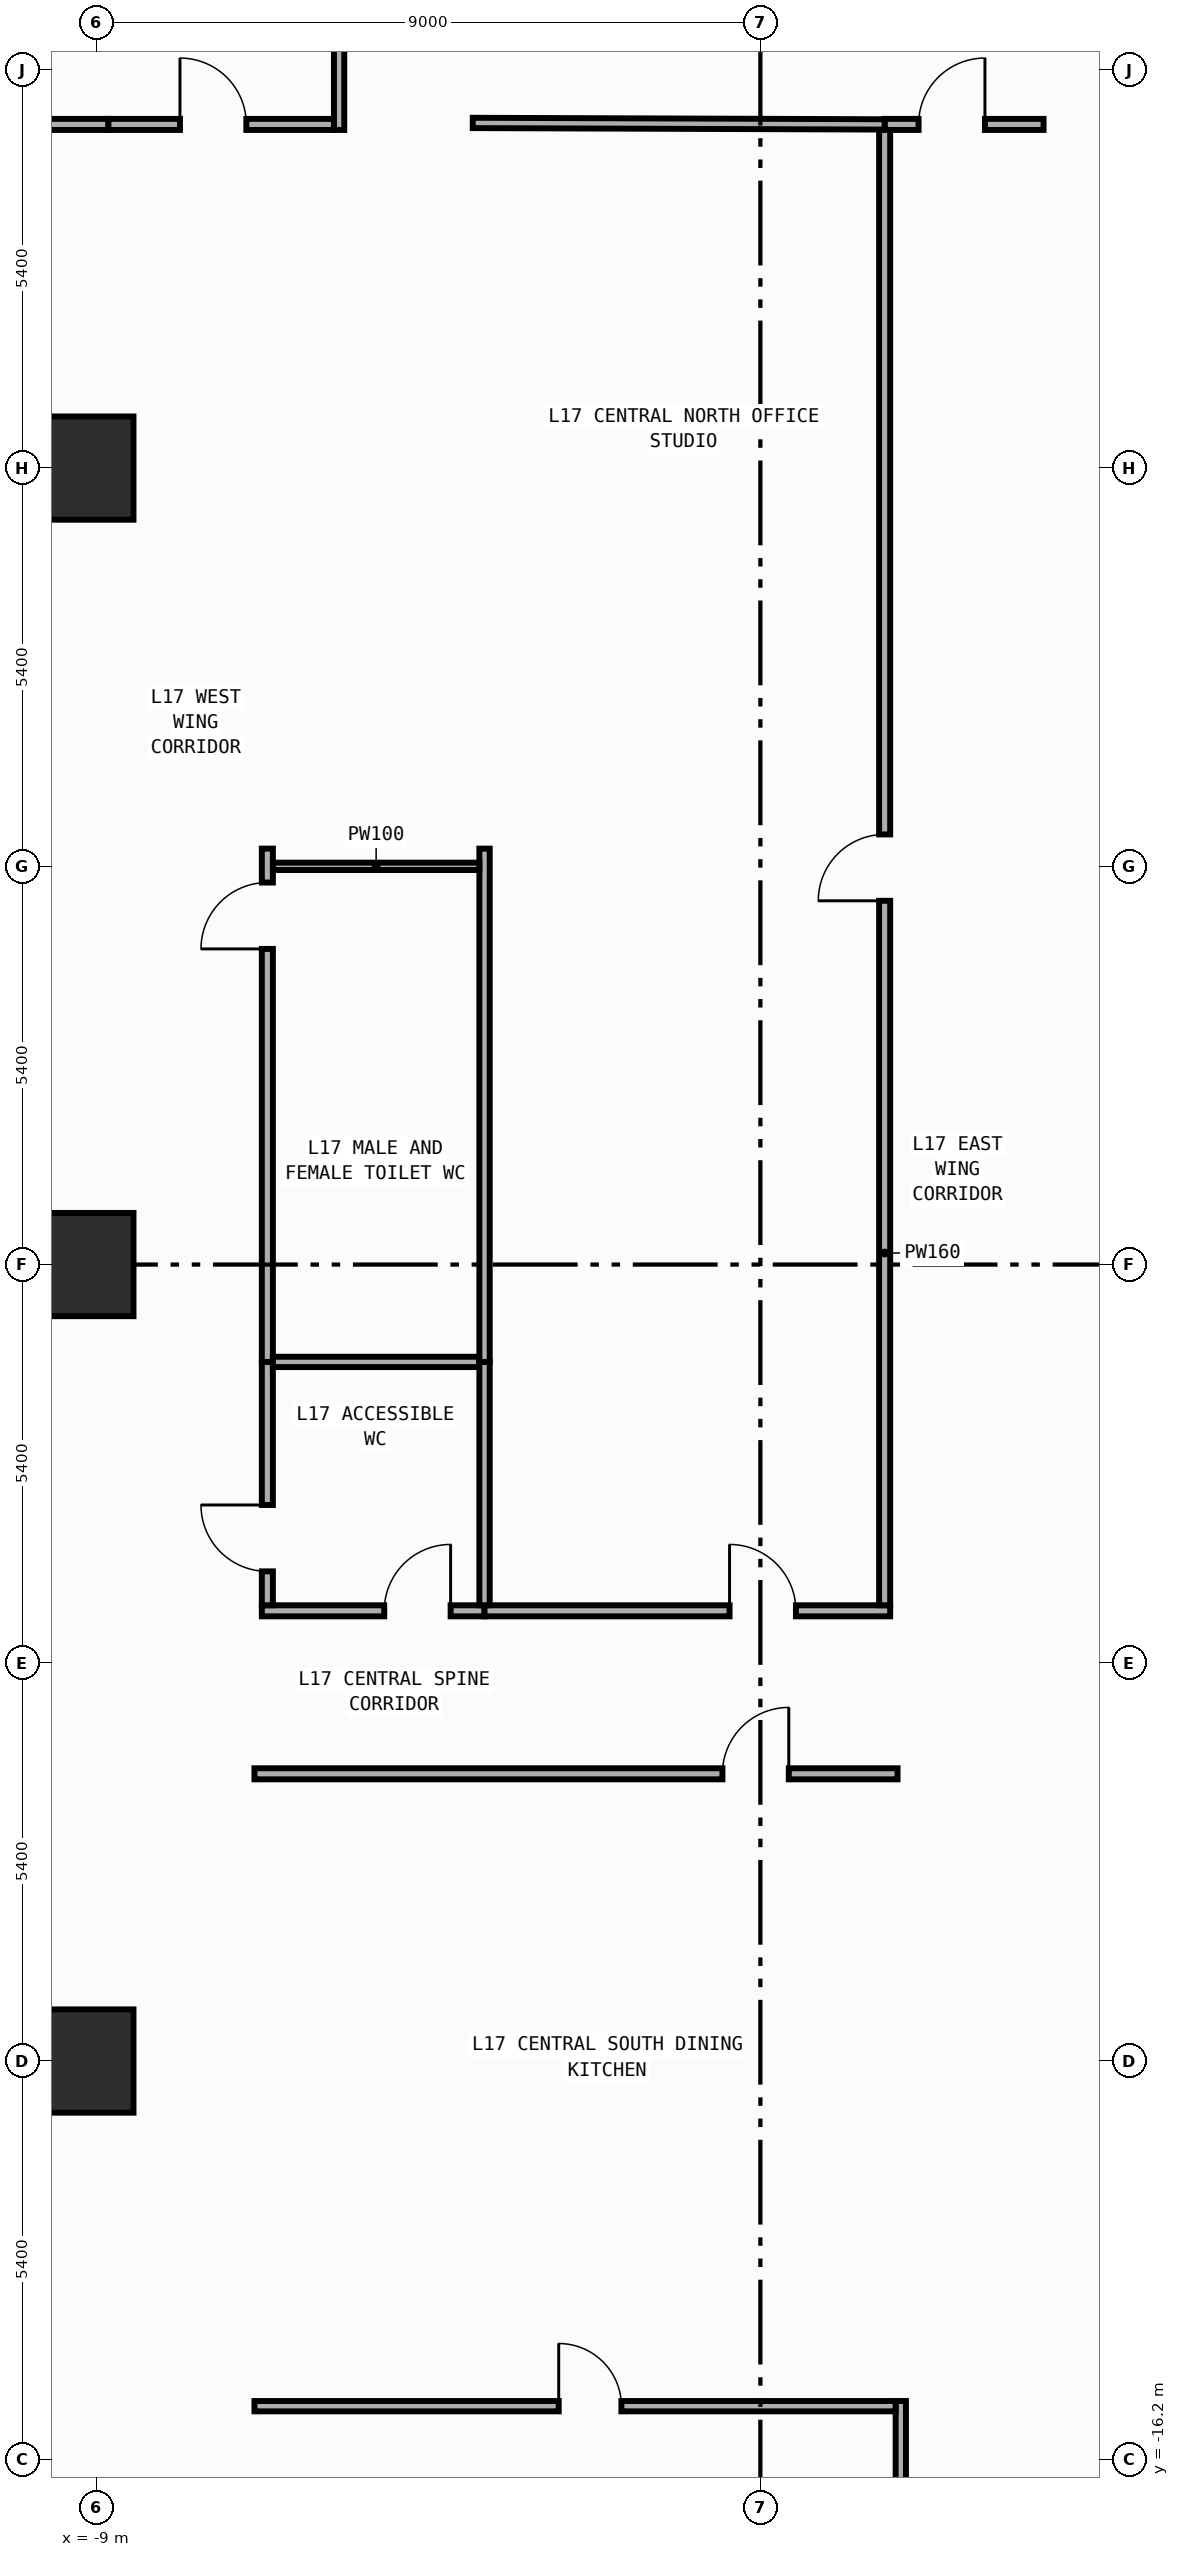
"""IFC4 building model, lengths in metres.
Left out: names, types, materials, properties, quantities, classifications, styles, units other than length and angle.
Written with IfcOpenShell. Run it as: python <this file> out.ifc"""

import sys

from ifc_helpers import new_model, si_unit, direction, frame, frame_2d, origin, origin_2d, place, context, subcontext, project, spatial, rectangle, extrude, element, fill, save


model = new_model("IFC4")
c1 = context("Model", 3, precision=1e-05, world=origin(), true_north=direction((0.0, 1.0)))
c2 = subcontext(c1, "Body", "Model", "MODEL_VIEW")
j1 = project(units=[si_unit("LENGTHUNIT", "METRE"), si_unit("PLANEANGLEUNIT", "RADIAN")], contexts=[c1])
p1 = place(None, origin())
s1 = spatial("IfcSite", under=j1, at=p1, CompositionType="ELEMENT")
p2 = place(p1, origin())
s2 = spatial("IfcBuilding", under=s1, at=p2, CompositionType="ELEMENT")
p3 = place(p2, frame((0.0, 0.0, 72.2)))
s3 = spatial("IfcBuildingStorey", under=s2, at=p3, CompositionType="ELEMENT", Elevation=72.2)
for number, where, z_axis, x_axis in (
    (1, (-9.2, -10.8, 0.0), (0.0, 0.0, 1.0), (1.0, 0.0, 0.0)),
    (2, (-9.2, 0.0, 0.0), (0.0, 0.0, 1.0), (1.0, 0.0, 0.0)),
    (3, (-9.2, 10.8, 0.0), (0.0, 0.0, 1.0), (1.0, 0.0, 0.0)),
):
    element("IfcColumn", number, at=place(p3, frame(where, z_axis=z_axis, x_axis=x_axis)), inside=s3, PredefinedType="COLUMN", context=c2, shape_type="SweptSolid", body=[
        extrude(rectangle(XDim=1.4, YDim=1.4, at=origin_2d()), origin(), (0.0, 0.0, 1.0), 4.2),
    ])
p4 = place(p3, frame((-11.99, 15.46, 0.0), z_axis=(0.0, 0.0, 1.0), x_axis=(1.0, 0.0, 0.0)))
e4 = element("IfcWall", 4, at=p4, inside=s3, PredefinedType="PARTITIONING", context=c2, shape_type="SweptSolid", body=[
    extrude(rectangle(XDim=3.15, YDim=0.15, at=frame_2d((1.575, 0.0))), origin(), (0.0, 0.0, 1.0), 3.94),
])
p5 = place(p4, frame((0.46, 0.0, 0.0)))
e5 = element("IfcOpeningElement", 5, at=p5, cuts=e4, PredefinedType="OPENING", context=c2, shape_type="SweptSolid", body=[
    extrude(rectangle(XDim=0.9, YDim=2.15, at=frame_2d((0.45, 1.075))), frame((0.0, 0.085, 0.0), z_axis=(0.0, -1.0, 0.0), x_axis=(1.0, 0.0, 0.0)), (0.0, 0.0, 1.0), 0.17),
])
p6 = place(p3, frame((-6.76, -4.695, 0.0), z_axis=(0.0, 0.0, 1.0), x_axis=(1.0, 0.0, 0.0)))
e6 = element("IfcWall", 6, at=p6, inside=s3, PredefinedType="PARTITIONING", context=c2, shape_type="SweptSolid", body=[
    extrude(rectangle(XDim=3.02, YDim=0.15, at=frame_2d((1.51, 0.0))), origin(), (0.0, 0.0, 1.0), 3.94),
])
p7 = place(p6, frame((1.66, 0.0, 0.0)))
e7 = element("IfcOpeningElement", 7, at=p7, cuts=e6, PredefinedType="OPENING", context=c2, shape_type="SweptSolid", body=[
    extrude(rectangle(XDim=0.9, YDim=2.15, at=frame_2d((0.45, 1.075))), frame((0.0, 0.085, 0.0), z_axis=(0.0, -1.0, 0.0), x_axis=(1.0, 0.0, 0.0)), (0.0, 0.0, 1.0), 0.17),
])
p8 = place(p3, frame((-3.74, -4.695, 0.0), z_axis=(0.0, 0.0, 1.0), x_axis=(1.0, 0.0, 0.0)))
e8 = element("IfcWall", 8, at=p8, inside=s3, PredefinedType="PARTITIONING", context=c2, shape_type="SweptSolid", body=[
    extrude(rectangle(XDim=5.5, YDim=0.15, at=frame_2d((2.75, 0.0))), origin(), (0.0, 0.0, 1.0), 3.94),
])
p9 = place(p8, frame((3.322, 0.0, 0.0)))
e9 = element("IfcOpeningElement", 9, at=p9, cuts=e8, PredefinedType="OPENING", context=c2, shape_type="SweptSolid", body=[
    extrude(rectangle(XDim=0.9, YDim=2.15, at=frame_2d((0.45, 1.075))), frame((0.0, 0.085, 0.0), z_axis=(0.0, -1.0, 0.0), x_axis=(1.0, 0.0, 0.0)), (0.0, 0.0, 1.0), 0.17),
])
p10 = place(p3, frame((-6.86, -6.905, 0.0), z_axis=(0.0, 0.0, 1.0), x_axis=(1.0, 0.0, 0.0)))
e10 = element("IfcWall", 10, at=p10, inside=s3, PredefinedType="PARTITIONING", context=c2, shape_type="SweptSolid", body=[
    extrude(rectangle(XDim=8.72, YDim=0.15, at=frame_2d((4.36, 0.0))), origin(), (0.0, 0.0, 1.0), 3.94),
])
p11 = place(p10, frame((6.345, 0.0, 0.0)))
e11 = element("IfcOpeningElement", 11, at=p11, cuts=e10, PredefinedType="OPENING", context=c2, shape_type="SweptSolid", body=[
    extrude(rectangle(XDim=0.9, YDim=2.15, at=frame_2d((0.45, 1.075))), frame((0.0, 0.085, 0.0), z_axis=(0.0, -1.0, 0.0), x_axis=(1.0, 0.0, 0.0)), (0.0, 0.0, 1.0), 0.17),
])
p12 = place(p3, frame((-8.84, 15.46, 0.0), z_axis=(0.0, 0.0, 1.0), x_axis=(1.0, 0.0, 0.0)))
e12 = element("IfcWall", 12, at=p12, inside=s3, PredefinedType="PARTITIONING", context=c2, shape_type="SweptSolid", body=[
    extrude(rectangle(XDim=3.058, YDim=0.15, at=frame_2d((1.529, 0.0))), origin(), (0.0, 0.0, 1.0), 3.94),
])
p13 = place(p12, frame((0.97, 0.0, 0.0)))
e13 = element("IfcOpeningElement", 13, at=p13, cuts=e12, PredefinedType="OPENING", context=c2, shape_type="SweptSolid", body=[
    extrude(rectangle(XDim=0.9, YDim=2.15, at=frame_2d((0.45, 1.075))), frame((0.0, 0.085, 0.0), z_axis=(0.0, -1.0, 0.0), x_axis=(1.0, 0.0, 0.0)), (0.0, 0.0, 1.0), 0.17),
])
p14 = place(p3, frame((-6.685, -4.62, 0.0), z_axis=(0.0, 0.0, 1.0), x_axis=(0.0, 1.0, 0.0)))
e14 = element("IfcWall", 14, at=p14, inside=s3, PredefinedType="PARTITIONING", context=c2, shape_type="SweptSolid", body=[
    extrude(rectangle(XDim=3.3, YDim=0.15, at=frame_2d((1.65, 0.0))), origin(), (0.0, 0.0, 1.0), 3.94),
])
p15 = place(p14, frame((0.46, 0.0, 0.0)))
e15 = element("IfcOpeningElement", 15, at=p15, cuts=e14, PredefinedType="OPENING", context=c2, shape_type="SweptSolid", body=[
    extrude(rectangle(XDim=0.9, YDim=2.15, at=frame_2d((0.45, 1.075))), frame((0.0, 0.085, 0.0), z_axis=(0.0, -1.0, 0.0), x_axis=(1.0, 0.0, 0.0)), (0.0, 0.0, 1.0), 0.17),
])
p16 = place(p3, frame((-6.685, -1.32, 0.0), z_axis=(0.0, 0.0, 1.0), x_axis=(0.0, 1.0, 0.0)))
e16 = element("IfcWall", 16, at=p16, inside=s3, PredefinedType="PARTITIONING", context=c2, shape_type="SweptSolid", body=[
    extrude(rectangle(XDim=6.96, YDim=0.15, at=frame_2d((3.48, 0.0))), origin(), (0.0, 0.0, 1.0), 3.94),
])
p17 = place(p16, frame((5.6, 0.0, 0.0)))
e17 = element("IfcOpeningElement", 17, at=p17, cuts=e16, PredefinedType="OPENING", context=c2, shape_type="SweptSolid", body=[
    extrude(rectangle(XDim=0.9, YDim=2.15, at=frame_2d((0.45, 1.075))), frame((0.0, 0.085, 0.0), z_axis=(0.0, -1.0, 0.0), x_axis=(1.0, 0.0, 0.0)), (0.0, 0.0, 1.0), 0.17),
])
p18 = place(p3, frame((1.685, 15.46, 0.0), z_axis=(0.0, 0.0, 1.0), x_axis=(1.0, 0.0, 0.0)))
e18 = element("IfcWall", 18, at=p18, inside=s3, PredefinedType="PARTITIONING", context=c2, shape_type="SweptSolid", body=[
    extrude(rectangle(XDim=2.155, YDim=0.15, at=frame_2d((1.078, 0.0))), origin(), (0.0, 0.0, 1.0), 3.94),
])
p19 = place(p18, frame((0.46, 0.0, 0.0)))
e19 = element("IfcOpeningElement", 19, at=p19, cuts=e18, PredefinedType="OPENING", context=c2, shape_type="SweptSolid", body=[
    extrude(rectangle(XDim=0.9, YDim=2.15, at=frame_2d((0.45, 1.075))), frame((0.0, 0.085, 0.0), z_axis=(0.0, -1.0, 0.0), x_axis=(1.0, 0.0, 0.0)), (0.0, 0.0, 1.0), 0.17),
])
p20 = place(p3, frame((1.685, -4.62, 0.0), z_axis=(0.0, 0.0, 1.0), x_axis=(0.0, 1.0, 0.0)))
e20 = element("IfcWall", 20, at=p20, inside=s3, PredefinedType="PARTITIONING", context=c2, shape_type="SweptSolid", body=[
    extrude(rectangle(XDim=20.005, YDim=0.15, at=frame_2d((10.002, 0.0))), origin(), (0.0, 0.0, 1.0), 3.94),
])
p21 = place(p20, frame((9.552, 0.0, 0.0)))
e21 = element("IfcOpeningElement", 21, at=p21, cuts=e20, PredefinedType="OPENING", context=c2, shape_type="SweptSolid", body=[
    extrude(rectangle(XDim=0.9, YDim=2.15, at=frame_2d((0.45, 1.075))), frame((0.0, 0.085, 0.0), z_axis=(0.0, -1.0, 0.0), x_axis=(1.0, 0.0, 0.0)), (0.0, 0.0, 1.0), 0.17),
])
p22 = place(p3, frame((-5.712, 15.385, 0.0), z_axis=(0.0, 0.0, 1.0), x_axis=(0.0, 1.0, 0.0)))
e22 = element("IfcWall", 22, at=p22, inside=s3, PredefinedType="PARTITIONING", context=c2, shape_type="SweptSolid", body=[
    extrude(rectangle(XDim=11.47, YDim=0.14, at=frame_2d((5.735, 0.0))), origin(), (0.0, 0.0, 1.0), 3.94),
])
p23 = place(p3, frame((-3.9, 15.48, 0.0), z_axis=(0.0, 0.0, 1.0), x_axis=(0.999993575589, -0.003584519724, 0.0)))
e23 = element("IfcWall", 23, at=p23, inside=s3, PredefinedType="PARTITIONING", context=c2, shape_type="SweptSolid", body=[
    extrude(rectangle(XDim=5.585, YDim=0.14, at=frame_2d((2.792, 0.0))), origin(), (0.0, 0.0, 1.0), 3.94),
])
p24 = place(p3, frame((1.904, -26.756, 0.0), z_axis=(0.0, 0.0, 1.0), x_axis=(0.0, 1.0, 0.0)))
e24 = element("IfcWall", 24, at=p24, inside=s3, PredefinedType="PARTITIONING", context=c2, shape_type="SweptSolid", body=[
    extrude(rectangle(XDim=11.346, YDim=0.14, at=frame_2d((5.673, 0.0))), origin(), (0.0, 0.0, 1.0), 3.94),
])
p25 = place(p24, frame((0.46, 0.0, 0.0)))
e25 = element("IfcOpeningElement", 25, at=p25, cuts=e24, PredefinedType="OPENING", context=c2, shape_type="SweptSolid", body=[
    extrude(rectangle(XDim=0.85, YDim=2.1, at=frame_2d((0.425, 1.05))), frame((0.0, 0.08, 0.0), z_axis=(0.0, -1.0, 0.0), x_axis=(1.0, 0.0, 0.0)), (0.0, 0.0, 1.0), 0.16),
])
p26 = place(p3, frame((-6.86, -15.48, 0.0), z_axis=(0.0, 0.0, 1.0), x_axis=(1.0, 0.0, 0.0)))
e26 = element("IfcWall", 26, at=p26, inside=s3, PredefinedType="PARTITIONING", context=c2, shape_type="SweptSolid", body=[
    extrude(rectangle(XDim=8.694, YDim=0.14, at=frame_2d((4.347, 0.0))), origin(), (0.0, 0.0, 1.0), 3.94),
])
p27 = place(p26, frame((4.125, 0.0, 0.0)))
e27 = element("IfcOpeningElement", 27, at=p27, cuts=e26, PredefinedType="OPENING", context=c2, shape_type="SweptSolid", body=[
    extrude(rectangle(XDim=0.85, YDim=2.1, at=frame_2d((0.425, 1.05))), frame((0.0, 0.08, 0.0), z_axis=(0.0, -1.0, 0.0), x_axis=(1.0, 0.0, 0.0)), (0.0, 0.0, 1.0), 0.16),
])
p28 = place(p3, frame((-6.61, -1.32, 0.0), z_axis=(0.0, 0.0, 1.0), x_axis=(1.0, 0.0, 0.0)))
e28 = element("IfcWall", 28, at=p28, inside=s3, PredefinedType="PARTITIONING", context=c2, shape_type="SweptSolid", body=[
    extrude(rectangle(XDim=2.8, YDim=0.14, at=frame_2d((1.4, 0.0))), origin(), (0.0, 0.0, 1.0), 3.94),
])
p29 = place(p3, frame((-3.74, -4.62, 0.0), z_axis=(0.0, 0.0, 1.0), x_axis=(0.0, 1.0, 0.0)))
e29 = element("IfcWall", 29, at=p29, inside=s3, PredefinedType="PARTITIONING", context=c2, shape_type="SweptSolid", body=[
    extrude(rectangle(XDim=3.3, YDim=0.14, at=frame_2d((1.65, 0.0))), origin(), (0.0, 0.0, 1.0), 3.94),
])
p30 = place(p3, frame((-3.74, -1.32, 0.0), z_axis=(0.0, 0.0, 1.0), x_axis=(0.0, 1.0, 0.0)))
e30 = element("IfcWall", 30, at=p30, inside=s3, PredefinedType="PARTITIONING", context=c2, shape_type="SweptSolid", body=[
    extrude(rectangle(XDim=6.96, YDim=0.14, at=frame_2d((3.48, 0.0))), origin(), (0.0, 0.0, 1.0), 3.94),
])
p31 = place(p3, frame((-6.61, 5.4, 0.0), z_axis=(0.0, 0.0, 1.0), x_axis=(1.0, 0.0, 0.0)))
e31 = element("IfcWall", 31, at=p31, inside=s3, PredefinedType="PARTITIONING", context=c2, shape_type="SweptSolid", body=[
    extrude(rectangle(XDim=2.8, YDim=0.1, at=frame_2d((1.4, 0.0))), origin(), (0.0, 0.0, 1.0), 3.94),
])
p32 = place(p7, origin())
e32 = element("IfcDoor", 32, at=p32, inside=s3, OperationType="SINGLE_SWING_RIGHT", PredefinedType="DOOR", context=c2, shape_type="SweptSolid", body=[
    extrude(rectangle(XDim=0.9, YDim=2.15, at=frame_2d((0.45, 1.075))), frame((0.0, 0.025, 0.0), z_axis=(0.0, -1.0, 0.0), x_axis=(1.0, 0.0, 0.0)), (0.0, 0.0, 1.0), 0.05),
])
fill(e7, e32)
p33 = place(p9, origin())
e33 = element("IfcDoor", 33, at=p33, inside=s3, OperationType="SINGLE_SWING_LEFT", PredefinedType="DOOR", context=c2, shape_type="SweptSolid", body=[
    extrude(rectangle(XDim=0.9, YDim=2.15, at=frame_2d((0.45, 1.075))), frame((0.0, 0.025, 0.0), z_axis=(0.0, -1.0, 0.0), x_axis=(1.0, 0.0, 0.0)), (0.0, 0.0, 1.0), 0.05),
])
fill(e9, e33)
p34 = place(p11, origin())
e34 = element("IfcDoor", 34, at=p34, inside=s3, OperationType="SINGLE_SWING_RIGHT", PredefinedType="DOOR", context=c2, shape_type="SweptSolid", body=[
    extrude(rectangle(XDim=0.9, YDim=2.15, at=frame_2d((0.45, 1.075))), frame((0.0, 0.025, 0.0), z_axis=(0.0, -1.0, 0.0), x_axis=(1.0, 0.0, 0.0)), (0.0, 0.0, 1.0), 0.05),
])
fill(e11, e34)
p35 = place(p13, origin())
e35 = element("IfcDoor", 35, at=p35, inside=s3, OperationType="SINGLE_SWING_LEFT", PredefinedType="DOOR", context=c2, shape_type="SweptSolid", body=[
    extrude(rectangle(XDim=0.9, YDim=2.15, at=frame_2d((0.45, 1.075))), frame((0.0, 0.025, 0.0), z_axis=(0.0, -1.0, 0.0), x_axis=(1.0, 0.0, 0.0)), (0.0, 0.0, 1.0), 0.05),
])
fill(e13, e35)
p36 = place(p15, origin())
e36 = element("IfcDoor", 36, at=p36, inside=s3, OperationType="SINGLE_SWING_RIGHT", PredefinedType="DOOR", context=c2, shape_type="SweptSolid", body=[
    extrude(rectangle(XDim=0.9, YDim=2.15, at=frame_2d((0.45, 1.075))), frame((0.0, 0.025, 0.0), z_axis=(0.0, -1.0, 0.0), x_axis=(1.0, 0.0, 0.0)), (0.0, 0.0, 1.0), 0.05),
])
fill(e15, e36)
p37 = place(p17, origin())
e37 = element("IfcDoor", 37, at=p37, inside=s3, OperationType="SINGLE_SWING_LEFT", PredefinedType="DOOR", context=c2, shape_type="SweptSolid", body=[
    extrude(rectangle(XDim=0.9, YDim=2.15, at=frame_2d((0.45, 1.075))), frame((0.0, 0.025, 0.0), z_axis=(0.0, -1.0, 0.0), x_axis=(1.0, 0.0, 0.0)), (0.0, 0.0, 1.0), 0.05),
])
fill(e17, e37)
p38 = place(p19, origin())
e38 = element("IfcDoor", 38, at=p38, inside=s3, OperationType="SINGLE_SWING_RIGHT", PredefinedType="DOOR", context=c2, shape_type="SweptSolid", body=[
    extrude(rectangle(XDim=0.9, YDim=2.15, at=frame_2d((0.45, 1.075))), frame((0.0, 0.025, 0.0), z_axis=(0.0, -1.0, 0.0), x_axis=(1.0, 0.0, 0.0)), (0.0, 0.0, 1.0), 0.05),
])
fill(e19, e38)
p39 = place(p21, origin())
e39 = element("IfcDoor", 39, at=p39, inside=s3, OperationType="SINGLE_SWING_LEFT", PredefinedType="DOOR", context=c2, shape_type="SweptSolid", body=[
    extrude(rectangle(XDim=0.9, YDim=2.15, at=frame_2d((0.45, 1.075))), frame((0.0, 0.025, 0.0), z_axis=(0.0, -1.0, 0.0), x_axis=(1.0, 0.0, 0.0)), (0.0, 0.0, 1.0), 0.05),
])
fill(e21, e39)
p40 = place(p27, origin())
e40 = element("IfcDoor", 40, at=p40, inside=s3, OperationType="SINGLE_SWING_LEFT", PredefinedType="DOOR", context=c2, shape_type="SweptSolid", body=[
    extrude(rectangle(XDim=0.85, YDim=2.1, at=frame_2d((0.425, 1.05))), frame((0.0, 0.025, 0.0), z_axis=(0.0, -1.0, 0.0), x_axis=(1.0, 0.0, 0.0)), (0.0, 0.0, 1.0), 0.05),
])
fill(e27, e40)
save(model, sys.argv[1])
